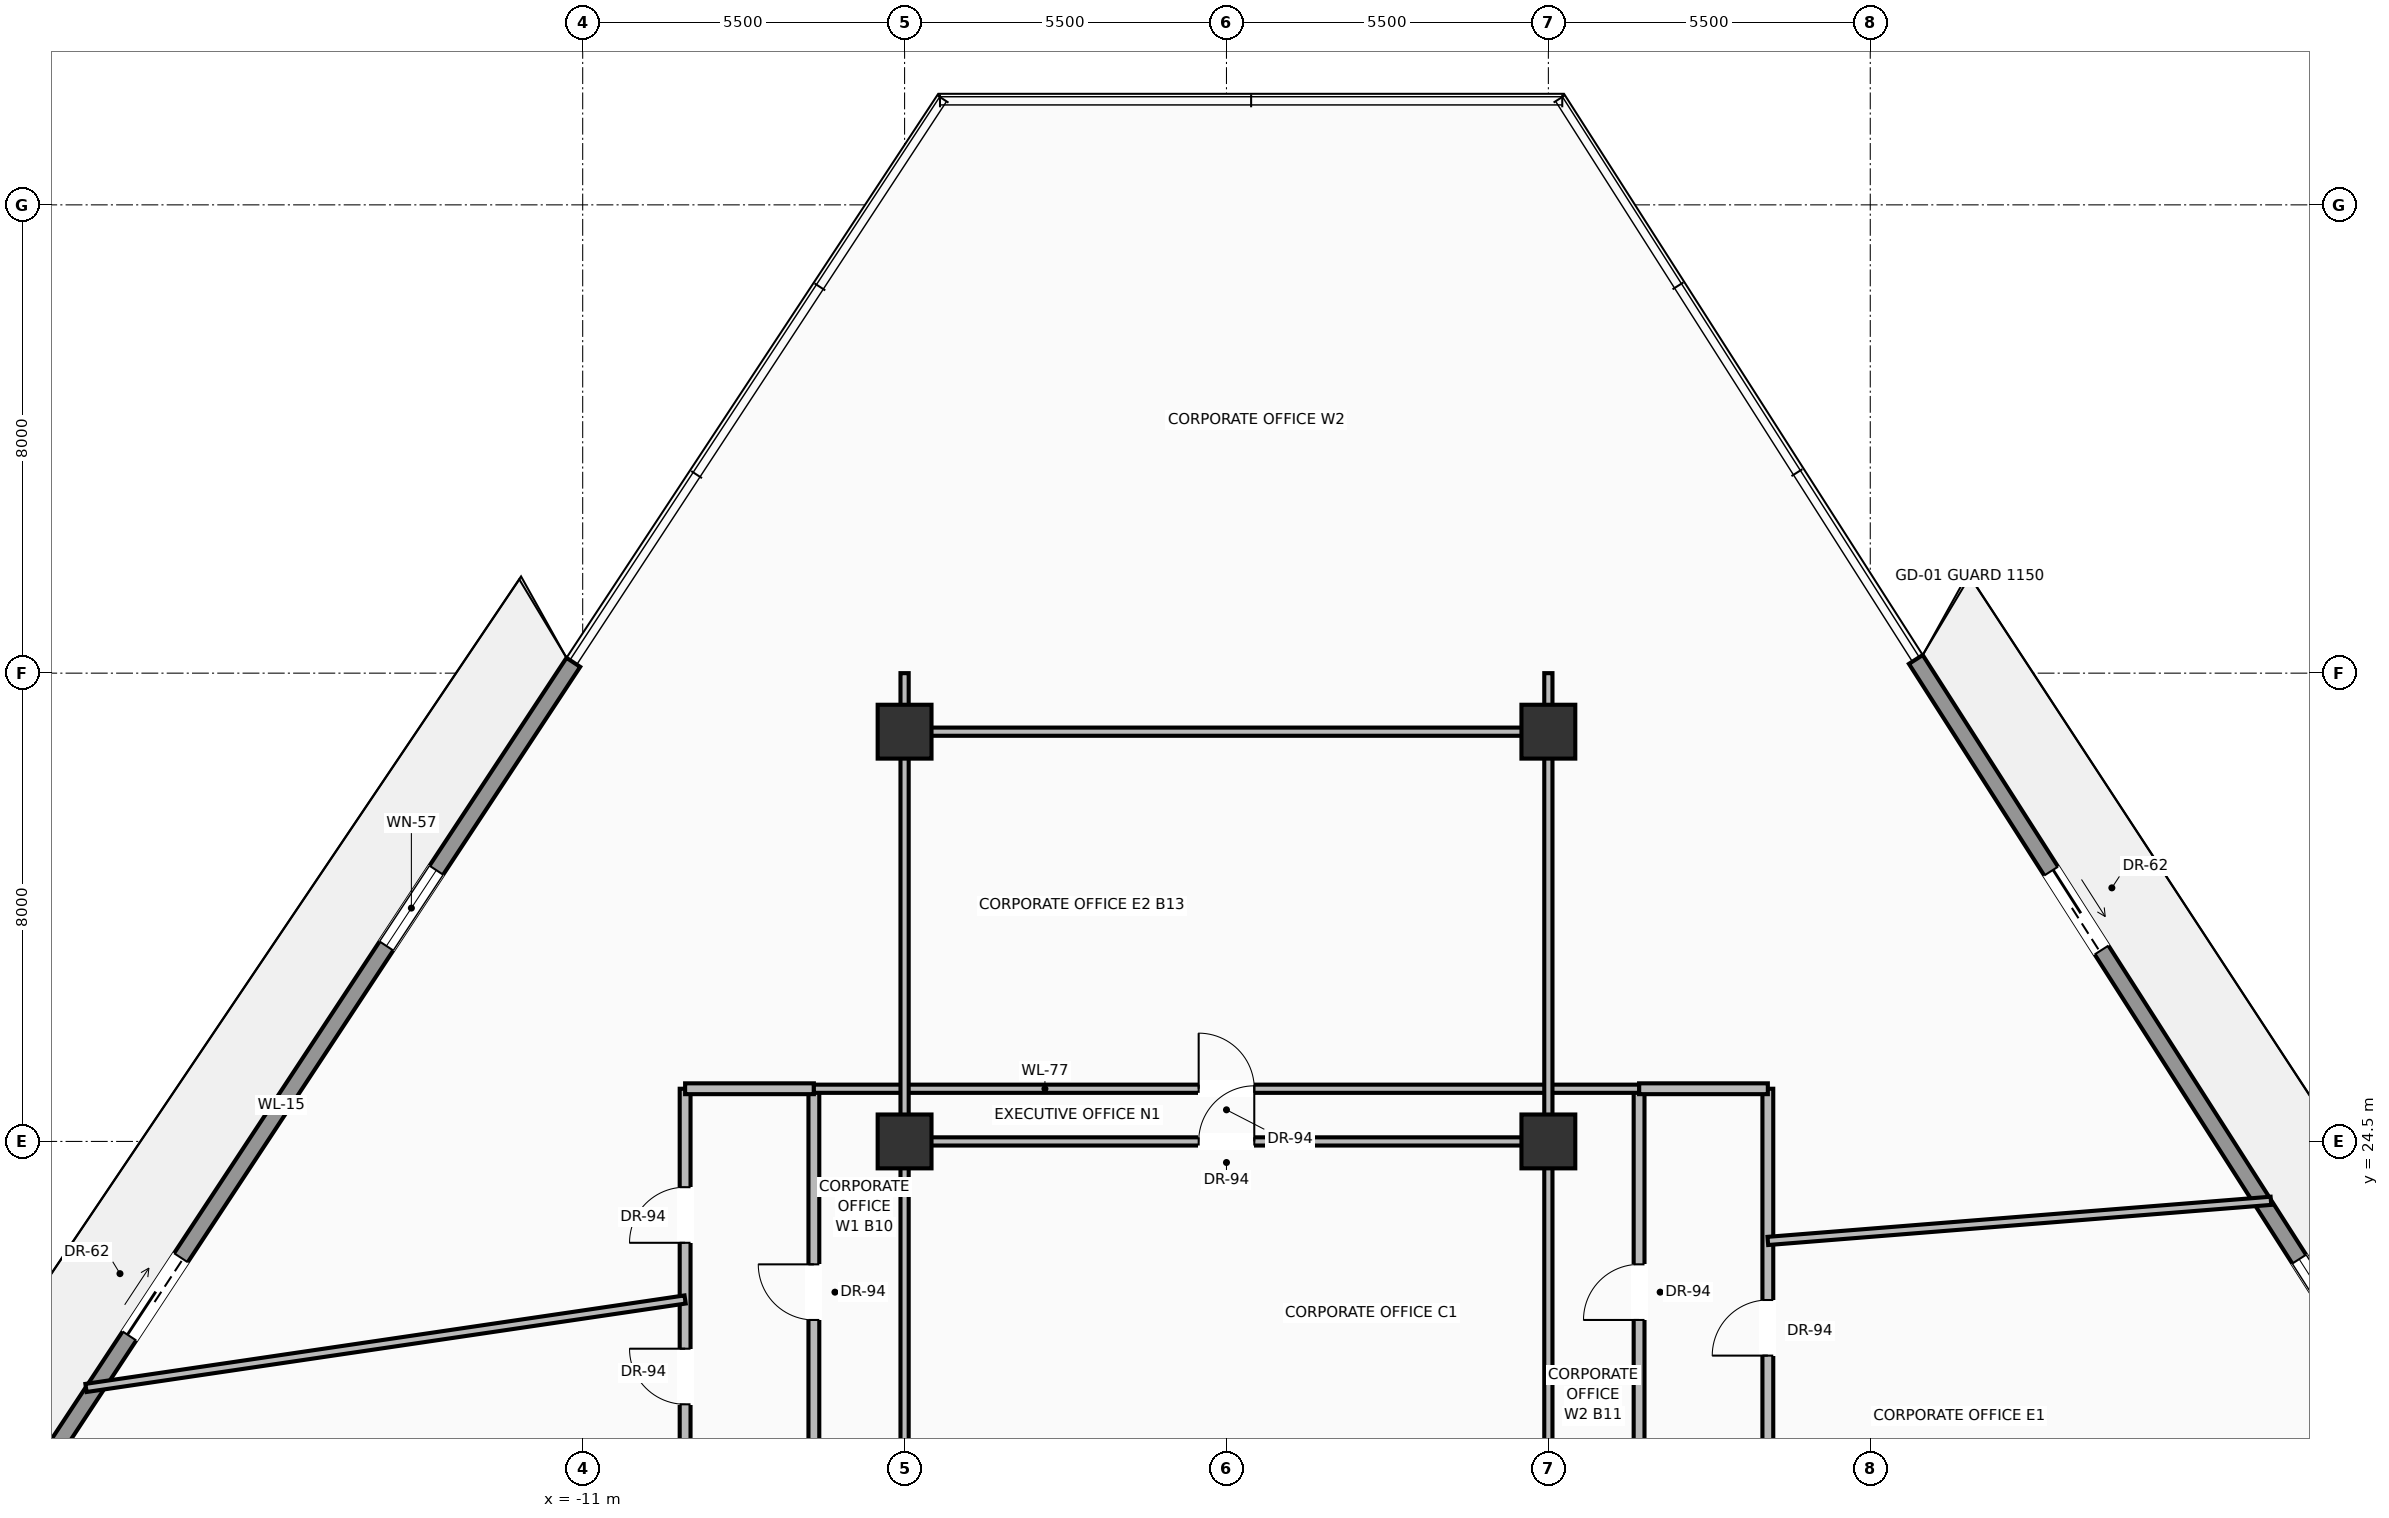
"""IFC4 building model, lengths in metres.
Left out: names, types, materials, properties, quantities, classifications, styles, units other than length and angle.
Written with IfcOpenShell. Run it as: python <this file> out.ifc"""

import sys

from ifc_helpers import new_model, si_unit, direction, frame, frame_2d, origin, origin_2d, place, context, subcontext, project, spatial, rectangle, extrude, source, transform, mapped, element, fill, save


model = new_model("IFC4")
c1 = context("Model", 3, precision=1e-05, world=origin(), true_north=direction((0.0, 1.0)))
c2 = subcontext(c1, "Body", "Model", "MODEL_VIEW")
j1 = project(units=[si_unit("LENGTHUNIT", "METRE"), si_unit("PLANEANGLEUNIT", "RADIAN")], contexts=[c1])
p1 = place(None, origin())
s1 = spatial("IfcSite", under=j1, at=p1, CompositionType="ELEMENT")
p2 = place(p1, origin())
s2 = spatial("IfcBuilding", under=s1, at=p2, CompositionType="ELEMENT")
p3 = place(p2, frame((0.0, 0.0, 125.6)))
s3 = spatial("IfcBuildingStorey", under=s2, at=p3, CompositionType="ELEMENT", Elevation=125.6)
m1 = source(origin(), c2, "Body", "SweptSolid", [
    extrude(rectangle(XDim=0.92, YDim=0.92, at=origin_2d()), origin(), (0.0, 0.0, 1.0), 3.7),
])
for number, where, z_axis, x_axis in (
    (1, (-5.5, 24.5, 0.0), (0.0, 0.0, 1.0), (1.0, 0.0, 0.0)),
    (2, (5.5, 24.5, 0.0), (0.0, 0.0, 1.0), (1.0, 0.0, 0.0)),
    (3, (-5.5, 31.5, 0.0), (0.0, 0.0, 1.0), (1.0, 0.0, 0.0)),
    (4, (5.5, 31.5, 0.0), (0.0, 0.0, 1.0), (1.0, 0.0, 0.0)),
):
    element("IfcColumn", number, at=place(p3, frame(where, z_axis=z_axis, x_axis=x_axis)), inside=s3, PredefinedType="COLUMN", context=c2, shape_type="MappedRepresentation", body=[
        mapped(m1, transform((0.0, 0.0, 0.0), scale=1.0)),
    ])
p4 = place(p3, frame((-21.141, 17.543, 0.0), z_axis=(0.0, 0.0, 1.0), x_axis=(0.550355807865, 0.834930227474, 0.0)))
e5 = element("IfcWall", 5, at=p4, inside=s3, PredefinedType="SOLIDWALL", context=c2, shape_type="SweptSolid", body=[
    extrude(rectangle(XDim=18.135, YDim=0.28, at=frame_2d((9.068, 0.0))), origin(), (0.0, 0.0, 1.0), 3.05),
])
p5 = place(p4, frame((4.353, 0.0, 0.0)))
e6 = element("IfcOpeningElement", 6, at=p5, cuts=e5, PredefinedType="OPENING", context=c2, shape_type="SweptSolid", body=[
    extrude(rectangle(XDim=1.6, YDim=2.35, at=frame_2d((0.8, 1.175))), frame((0.0, 0.15, 0.0), z_axis=(0.0, -1.0, 0.0), x_axis=(1.0, 0.0, 0.0)), (0.0, 0.0, 1.0), 0.3),
])
p6 = place(p4, frame((12.332, 0.0, 0.9)))
e7 = element("IfcOpeningElement", 7, at=p6, cuts=e5, PredefinedType="OPENING", context=c2, shape_type="SweptSolid", body=[
    extrude(rectangle(XDim=1.55, YDim=1.85, at=frame_2d((0.775, 0.925))), frame((0.0, 0.15, 0.0), z_axis=(0.0, -1.0, 0.0), x_axis=(1.0, 0.0, 0.0)), (0.0, 0.0, 1.0), 0.3),
])
p7 = place(p3, frame((11.779, 32.734, 0.0), z_axis=(0.0, 0.0, 1.0), x_axis=(0.538643749174, -0.842533626318, 0.0)))
e8 = element("IfcWall", 8, at=p7, inside=s3, PredefinedType="SOLIDWALL", context=c2, shape_type="SweptSolid", body=[
    extrude(rectangle(XDim=17.883, YDim=0.28, at=frame_2d((8.941, 0.0))), origin(), (0.0, 0.0, 1.0), 3.05),
])
p8 = place(p7, frame((4.292, 0.0, 0.0)))
e9 = element("IfcOpeningElement", 9, at=p8, cuts=e8, PredefinedType="OPENING", context=c2, shape_type="SweptSolid", body=[
    extrude(rectangle(XDim=1.6, YDim=2.35, at=frame_2d((0.8, 1.175))), frame((0.0, 0.15, 0.0), z_axis=(0.0, -1.0, 0.0), x_axis=(1.0, 0.0, 0.0)), (0.0, 0.0, 1.0), 0.3),
])
p9 = place(p7, frame((12.16, 0.0, 0.9)))
e10 = element("IfcOpeningElement", 10, at=p9, cuts=e8, PredefinedType="OPENING", context=c2, shape_type="SweptSolid", body=[
    extrude(rectangle(XDim=1.55, YDim=1.85, at=frame_2d((0.775, 0.925))), frame((0.0, 0.15, 0.0), z_axis=(0.0, -1.0, 0.0), x_axis=(1.0, 0.0, 0.0)), (0.0, 0.0, 1.0), 0.3),
])
p10 = place(p3, frame((-7.05, 18.45, 0.0), z_axis=(0.0, 0.0, 1.0), x_axis=(0.0, 1.0, 0.0)))
e11 = element("IfcWall", 11, at=p10, inside=s3, PredefinedType="PARTITIONING", context=c2, shape_type="SweptSolid", body=[
    extrude(rectangle(XDim=6.95, YDim=0.185, at=frame_2d((3.475, 0.0))), origin(), (0.0, 0.0, 1.0), 2.846),
])
p11 = place(p10, frame((3.0, 0.0, 0.0)))
e12 = element("IfcOpeningElement", 12, at=p11, cuts=e11, PredefinedType="OPENING", context=c2, shape_type="SweptSolid", body=[
    extrude(rectangle(XDim=0.95, YDim=2.2, at=frame_2d((0.475, 1.1))), frame((0.0, 0.103, 0.0), z_axis=(0.0, -1.0, 0.0), x_axis=(1.0, 0.0, 0.0)), (0.0, 0.0, 1.0), 0.205),
])
p12 = place(p3, frame((7.05, 18.45, 0.0), z_axis=(0.0, 0.0, 1.0), x_axis=(0.0, 1.0, 0.0)))
e13 = element("IfcWall", 13, at=p12, inside=s3, PredefinedType="PARTITIONING", context=c2, shape_type="SweptSolid", body=[
    extrude(rectangle(XDim=6.95, YDim=0.185, at=frame_2d((3.475, 0.0))), origin(), (0.0, 0.0, 1.0), 2.846),
])
p13 = place(p12, frame((3.0, 0.0, 0.0)))
e14 = element("IfcOpeningElement", 14, at=p13, cuts=e13, PredefinedType="OPENING", context=c2, shape_type="SweptSolid", body=[
    extrude(rectangle(XDim=0.95, YDim=2.2, at=frame_2d((0.475, 1.1))), frame((0.0, 0.103, 0.0), z_axis=(0.0, -1.0, 0.0), x_axis=(1.0, 0.0, 0.0)), (0.0, 0.0, 1.0), 0.205),
])
p14 = place(p3, frame((-9.25, 16.4, 0.0), z_axis=(0.0, 0.0, 1.0), x_axis=(0.0, 1.0, 0.0)))
e15 = element("IfcWall", 15, at=p14, inside=s3, PredefinedType="PARTITIONING", context=c2, shape_type="SweptSolid", body=[
    extrude(rectangle(XDim=9.0, YDim=0.185, at=frame_2d((4.5, 0.0))), origin(), (0.0, 0.0, 1.0), 2.846),
])
p15 = place(p14, frame((3.609, 0.0, 0.0)))
e16 = element("IfcOpeningElement", 16, at=p15, cuts=e15, PredefinedType="OPENING", context=c2, shape_type="SweptSolid", body=[
    extrude(rectangle(XDim=0.95, YDim=2.2, at=frame_2d((0.475, 1.1))), frame((0.0, 0.103, 0.0), z_axis=(0.0, -1.0, 0.0), x_axis=(1.0, 0.0, 0.0)), (0.0, 0.0, 1.0), 0.205),
])
p16 = place(p14, frame((6.368, 0.0, 0.0)))
e17 = element("IfcOpeningElement", 17, at=p16, cuts=e15, PredefinedType="OPENING", context=c2, shape_type="SweptSolid", body=[
    extrude(rectangle(XDim=0.95, YDim=2.2, at=frame_2d((0.475, 1.1))), frame((0.0, 0.103, 0.0), z_axis=(0.0, -1.0, 0.0), x_axis=(1.0, 0.0, 0.0)), (0.0, 0.0, 1.0), 0.205),
])
p17 = place(p3, frame((9.25, 16.4, 0.0), z_axis=(0.0, 0.0, 1.0), x_axis=(0.0, 1.0, 0.0)))
e18 = element("IfcWall", 18, at=p17, inside=s3, PredefinedType="PARTITIONING", context=c2, shape_type="SweptSolid", body=[
    extrude(rectangle(XDim=9.0, YDim=0.185, at=frame_2d((4.5, 0.0))), origin(), (0.0, 0.0, 1.0), 2.846),
])
p18 = place(p17, frame((4.441, 0.0, 0.0)))
e19 = element("IfcOpeningElement", 19, at=p18, cuts=e18, PredefinedType="OPENING", context=c2, shape_type="SweptSolid", body=[
    extrude(rectangle(XDim=0.95, YDim=2.2, at=frame_2d((0.475, 1.1))), frame((0.0, 0.103, 0.0), z_axis=(0.0, -1.0, 0.0), x_axis=(1.0, 0.0, 0.0)), (0.0, 0.0, 1.0), 0.205),
])
for number, where, z_axis, x_axis in (
    (20, (-9.25, 25.4, 0.0), (0.0, 0.0, 1.0), (1.0, 0.0, 0.0)),
    (21, (7.05, 25.4, 0.0), (0.0, 0.0, 1.0), (1.0, 0.0, 0.0)),
):
    element("IfcWall", number, at=place(p3, frame(where, z_axis=z_axis, x_axis=x_axis)), inside=s3, PredefinedType="PARTITIONING", context=c2, shape_type="SweptSolid", body=[
        extrude(rectangle(XDim=2.2, YDim=0.185, at=frame_2d((1.1, 0.0))), origin(), (0.0, 0.0, 1.0), 3.462),
    ])
p19 = place(p3, frame((-7.05, 25.4, 0.0), z_axis=(0.0, 0.0, 1.0), x_axis=(1.0, 0.0, 0.0)))
e22 = element("IfcWall", 22, at=p19, inside=s3, PredefinedType="PARTITIONING", context=c2, shape_type="SweptSolid", body=[
    extrude(rectangle(XDim=14.1, YDim=0.14, at=frame_2d((7.05, 0.0))), origin(), (0.0, 0.0, 1.0), 3.462),
])
p20 = place(p19, frame((6.575, 0.0, 0.0)))
e23 = element("IfcOpeningElement", 23, at=p20, cuts=e22, PredefinedType="OPENING", context=c2, shape_type="SweptSolid", body=[
    extrude(rectangle(XDim=0.95, YDim=2.2, at=frame_2d((0.475, 1.1))), frame((0.0, 0.08, 0.0), z_axis=(0.0, -1.0, 0.0), x_axis=(1.0, 0.0, 0.0)), (0.0, 0.0, 1.0), 0.16),
])
for number, where, z_axis, x_axis in (
    (24, (-5.5, 18.45, 0.0), (0.0, 0.0, 1.0), (0.0, 1.0, 0.0)),
    (25, (5.5, 18.45, 0.0), (0.0, 0.0, 1.0), (0.0, 1.0, 0.0)),
):
    element("IfcWall", number, at=place(p3, frame(where, z_axis=z_axis, x_axis=x_axis)), inside=s3, PredefinedType="PARTITIONING", context=c2, shape_type="SweptSolid", body=[
        extrude(rectangle(XDim=14.05, YDim=0.14, at=frame_2d((7.025, 0.0))), origin(), (0.0, 0.0, 1.0), 2.846),
    ])
p21 = place(p3, frame((-5.5, 24.5, 0.0), z_axis=(0.0, 0.0, 1.0), x_axis=(1.0, 0.0, 0.0)))
e26 = element("IfcWall", 26, at=p21, inside=s3, PredefinedType="PARTITIONING", context=c2, shape_type="SweptSolid", body=[
    extrude(rectangle(XDim=11.0, YDim=0.14, at=frame_2d((5.5, 0.0))), origin(), (0.0, 0.0, 1.0), 2.846),
])
p22 = place(p21, frame((5.025, 0.0, 0.0)))
e27 = element("IfcOpeningElement", 27, at=p22, cuts=e26, PredefinedType="OPENING", context=c2, shape_type="SweptSolid", body=[
    extrude(rectangle(XDim=0.95, YDim=2.2, at=frame_2d((0.475, 1.1))), frame((0.0, 0.08, 0.0), z_axis=(0.0, -1.0, 0.0), x_axis=(1.0, 0.0, 0.0)), (0.0, 0.0, 1.0), 0.16),
])
p23 = place(p3, frame((-5.5, 31.5, 0.0), z_axis=(0.0, 0.0, 1.0), x_axis=(1.0, 0.0, 0.0)))
e28 = element("IfcWall", 28, at=p23, inside=s3, PredefinedType="PARTITIONING", context=c2, shape_type="SweptSolid", body=[
    extrude(rectangle(XDim=11.0, YDim=0.14, at=frame_2d((5.5, 0.0))), origin(), (0.0, 0.0, 1.0), 2.846),
])
p24 = place(p3, frame((-19.487, 20.288, 0.0), z_axis=(0.0, 0.0, 1.0), x_axis=(0.989271254503, 0.146090331693, 0.0)))
e29 = element("IfcWall", 29, at=p24, inside=s3, PredefinedType="PARTITIONING", context=c2, shape_type="SweptSolid", body=[
    extrude(rectangle(XDim=10.348, YDim=0.14, at=frame_2d((5.174, 0.0))), origin(), (0.0, 0.0, 1.0), 3.462),
])
p25 = place(p3, frame((9.25, 22.8, 0.0), z_axis=(0.0, 0.0, 1.0), x_axis=(0.996834873158, 0.079499909791, 0.0)))
e30 = element("IfcWall", 30, at=p25, inside=s3, PredefinedType="PARTITIONING", context=c2, shape_type="SweptSolid", body=[
    extrude(rectangle(XDim=8.623, YDim=0.14, at=frame_2d((4.312, 0.0))), origin(), (0.0, 0.0, 1.0), 3.462),
])
m2 = source(origin(), c2, "Body", "SweptSolid", [
    extrude(rectangle(XDim=1.6, YDim=2.35, at=frame_2d((0.8, 1.175))), frame((0.0, 0.025, 0.0), z_axis=(0.0, -1.0, 0.0), x_axis=(1.0, 0.0, 0.0)), (0.0, 0.0, 1.0), 0.05),
])
p26 = place(p5, origin())
e31 = element("IfcDoor", 31, at=p26, inside=s3, OperationType="SLIDING_TO_LEFT", PredefinedType="DOOR", context=c2, shape_type="MappedRepresentation", body=[
    mapped(m2, transform((0.0, 0.0, 0.0), scale=1.0)),
])
fill(e6, e31)
m3 = source(origin(), c2, "Body", "SweptSolid", [
    extrude(rectangle(XDim=1.55, YDim=1.85, at=frame_2d((0.775, 0.925))), frame((0.0, 0.03, 0.0), z_axis=(0.0, -1.0, 0.0), x_axis=(1.0, 0.0, 0.0)), (0.0, 0.0, 1.0), 0.06),
])
p27 = place(p6, origin())
e32 = element("IfcWindow", 32, at=p27, inside=s3, PartitioningType="SINGLE_PANEL", PredefinedType="WINDOW", context=c2, shape_type="MappedRepresentation", body=[
    mapped(m3, transform((0.0, 0.0, 0.0), scale=1.0)),
])
fill(e7, e32)
p28 = place(p8, origin())
e33 = element("IfcDoor", 33, at=p28, inside=s3, OperationType="SLIDING_TO_RIGHT", PredefinedType="DOOR", context=c2, shape_type="MappedRepresentation", body=[
    mapped(m2, transform((0.0, 0.0, 0.0), scale=1.0)),
])
fill(e9, e33)
p29 = place(p9, origin())
e34 = element("IfcWindow", 34, at=p29, inside=s3, PartitioningType="SINGLE_PANEL", PredefinedType="WINDOW", context=c2, shape_type="MappedRepresentation", body=[
    mapped(m3, transform((0.0, 0.0, 0.0), scale=1.0)),
])
fill(e10, e34)
m4 = source(origin(), c2, "Body", "SweptSolid", [
    extrude(rectangle(XDim=0.95, YDim=2.2, at=frame_2d((0.475, 1.1))), frame((0.0, 0.025, 0.0), z_axis=(0.0, -1.0, 0.0), x_axis=(1.0, 0.0, 0.0)), (0.0, 0.0, 1.0), 0.05),
])
p30 = place(p15, origin())
e35 = element("IfcDoor", 35, at=p30, inside=s3, OperationType="SINGLE_SWING_RIGHT", PredefinedType="DOOR", context=c2, shape_type="MappedRepresentation", body=[
    mapped(m4, transform((0.0, 0.0, 0.0), scale=1.0)),
])
fill(e16, e35)
p31 = place(p18, origin())
e36 = element("IfcDoor", 36, at=p31, inside=s3, OperationType="SINGLE_SWING_LEFT", PredefinedType="DOOR", context=c2, shape_type="MappedRepresentation", body=[
    mapped(m4, transform((0.0, 0.0, 0.0), scale=1.0)),
])
fill(e19, e36)
p32 = place(p11, origin())
e37 = element("IfcDoor", 37, at=p32, inside=s3, OperationType="SINGLE_SWING_RIGHT", PredefinedType="DOOR", context=c2, shape_type="MappedRepresentation", body=[
    mapped(m4, transform((0.0, 0.0, 0.0), scale=1.0)),
])
fill(e12, e37)
p33 = place(p13, origin())
e38 = element("IfcDoor", 38, at=p33, inside=s3, OperationType="SINGLE_SWING_LEFT", PredefinedType="DOOR", context=c2, shape_type="MappedRepresentation", body=[
    mapped(m4, transform((0.0, 0.0, 0.0), scale=1.0)),
])
fill(e14, e38)
p34 = place(p22, origin())
e39 = element("IfcDoor", 39, at=p34, inside=s3, OperationType="SINGLE_SWING_RIGHT", PredefinedType="DOOR", context=c2, shape_type="MappedRepresentation", body=[
    mapped(m4, transform((0.0, 0.0, 0.0), scale=1.0)),
])
fill(e27, e39)
p35 = place(p16, origin())
e40 = element("IfcDoor", 40, at=p35, inside=s3, OperationType="SINGLE_SWING_LEFT", PredefinedType="DOOR", context=c2, shape_type="MappedRepresentation", body=[
    mapped(m4, transform((0.0, 0.0, 0.0), scale=1.0)),
])
fill(e17, e40)
p36 = place(p20, origin())
e41 = element("IfcDoor", 41, at=p36, inside=s3, OperationType="SINGLE_SWING_LEFT", PredefinedType="DOOR", context=c2, shape_type="MappedRepresentation", body=[
    mapped(m4, transform((0.0, 0.0, 0.0), scale=1.0)),
])
fill(e23, e41)
save(model, sys.argv[1])
